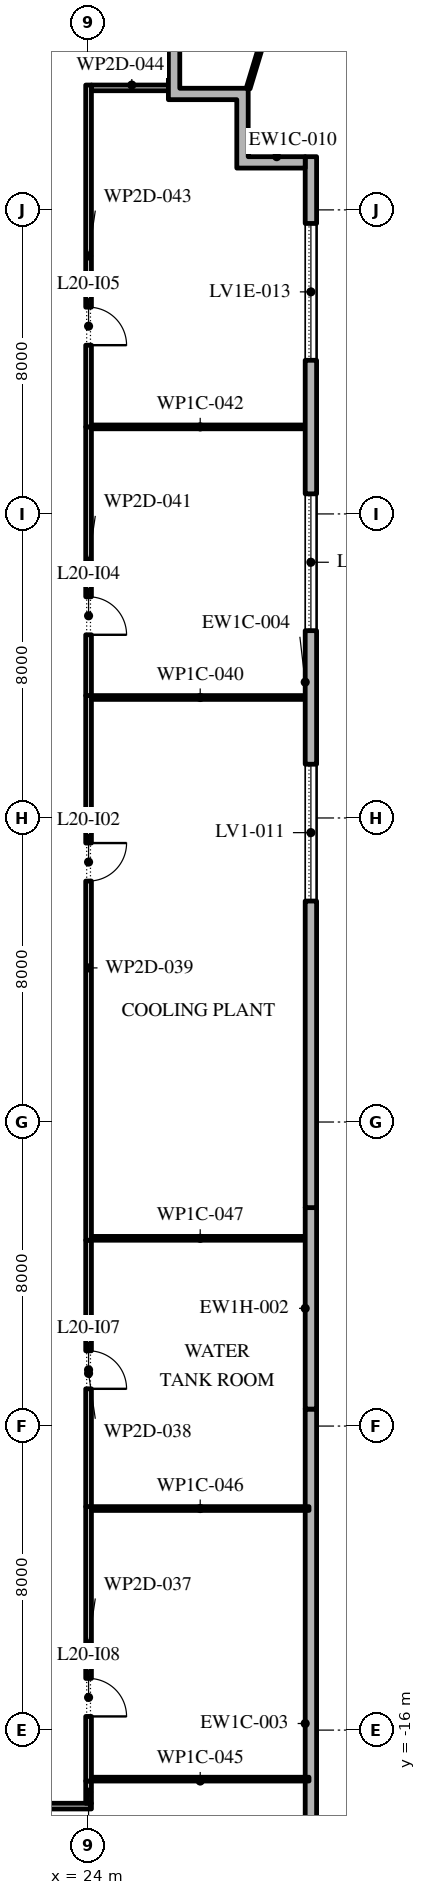
"""IFC4 building model, lengths in metres.
Left out: names, types, materials, properties, quantities, classifications, styles, units other than length and angle.
Written with IfcOpenShell. Run it as: python <this file> out.ifc"""

import sys

from ifc_helpers import new_model, si_unit, direction, frame, frame_2d, origin, place, context, subcontext, project, spatial, polyline, rectangle, outline, extrude, element, fill, save


model = new_model("IFC4")
c1 = context("Model", 3, precision=1e-05, world=origin(), true_north=direction((0.0, 1.0)))
c2 = subcontext(c1, "Body", "Model", "MODEL_VIEW")
j1 = project(units=[si_unit("LENGTHUNIT", "METRE"), si_unit("PLANEANGLEUNIT", "RADIAN")], contexts=[c1])
p1 = place(None, origin())
s1 = spatial("IfcSite", under=j1, at=p1, CompositionType="ELEMENT")
p2 = place(p1, origin())
s2 = spatial("IfcBuilding", under=s1, at=p2, CompositionType="ELEMENT")
p3 = place(p2, frame((0.0, 0.0, 94.2)))
s3 = spatial("IfcBuildingStorey", under=s2, at=p3, CompositionType="ELEMENT", Elevation=94.2)
p4 = place(p3, frame((29.85, -24.1, 0.0), z_axis=(0.0, 0.0, 1.0), x_axis=(0.0, 1.0, 0.0)))
e1 = element("IfcWall", 1, at=p4, inside=s3, PredefinedType="STANDARD", context=c2, shape_type="SweptSolid", body=[
    extrude(rectangle(XDim=16.547, YDim=0.3, at=frame_2d((8.273, 0.0))), origin(), (0.0, 0.0, 1.0), 4.95),
])
p5 = place(p3, origin())
e2 = element("IfcWall", 2, at=p5, inside=s3, PredefinedType="STANDARD", context=c2, shape_type="SweptSolid", body=[
    extrude(outline(polyline([(27.9, 26.9), (26.1, 26.9), (26.1, 29.0), (26.4, 29.0), (26.4, 27.2), (28.2, 27.2), (28.2, 25.4), (29.7, 25.4), (29.7, 25.1), (27.9, 25.1), (27.9, 26.9)])), origin(), (0.0, 0.0, 1.0), 4.95),
])
p6 = place(p3, frame((28.2, 27.2, -0.05), z_axis=(0.0, 0.0, 1.0), x_axis=(0.29036881155, 0.956914809834, 0.0)))
e3 = element("IfcWall", 3, at=p6, inside=s3, PredefinedType="STANDARD", context=c2, shape_type="SweptSolid", body=[
    extrude(rectangle(XDim=7.255, YDim=0.1, at=frame_2d((3.627, 0.0))), origin(), (0.0, 0.0, 1.0), 5.0),
])
p7 = place(p3, frame((24.075, -18.0, 0.0), z_axis=(0.0, 0.0, 1.0), x_axis=(-1.0, 0.0, 0.0)))
e4 = element("IfcWall", 4, at=p7, inside=s3, PredefinedType="PARTITIONING", context=c2, shape_type="SweptSolid", body=[
    extrude(rectangle(XDim=6.425, YDim=0.15, at=frame_2d((3.212, 0.0))), origin(), (0.0, 0.0, 1.0), 4.95),
])
p8 = place(p7, frame((2.075, 0.0, 0.0)))
e5 = element("IfcOpeningElement", 5, at=p8, cuts=e4, PredefinedType="OPENING", context=c2, shape_type="SweptSolid", body=[
    extrude(rectangle(XDim=1.0, YDim=2.1, at=frame_2d((0.5, 1.05))), frame((0.0, 0.085, 0.0), z_axis=(0.0, -1.0, 0.0), x_axis=(1.0, 0.0, 0.0)), (0.0, 0.0, 1.0), 0.17),
])
p9 = place(p3, frame((24.0, -17.34, 0.0), z_axis=(0.0, 0.0, 1.0), x_axis=(0.0, -1.0, 0.0)))
e6 = element("IfcWall", 6, at=p9, inside=s3, PredefinedType="PARTITIONING", context=c2, shape_type="SweptSolid", body=[
    extrude(rectangle(XDim=0.585, YDim=0.15, at=frame_2d((0.292, 0.0))), origin(), (0.0, 0.0, 1.0), 4.95),
])
p10 = place(p3, frame((24.0, -10.12, 0.0), z_axis=(0.0, 0.0, 1.0), x_axis=(0.0, -1.0, 0.0)))
e7 = element("IfcWall", 7, at=p10, inside=s3, PredefinedType="PARTITIONING", context=c2, shape_type="SweptSolid", body=[
    extrude(rectangle(XDim=7.22, YDim=0.15, at=frame_2d((3.61, 0.0))), origin(), (0.0, 0.0, 1.0), 4.95),
])
p11 = place(p10, frame((4.52, 0.0, 0.0)))
e8 = element("IfcOpeningElement", 8, at=p11, cuts=e7, PredefinedType="OPENING", context=c2, shape_type="SweptSolid", body=[
    extrude(rectangle(XDim=1.0, YDim=2.1, at=frame_2d((0.5, 1.05))), frame((0.0, 0.085, 0.0), z_axis=(0.0, -1.0, 0.0), x_axis=(1.0, 0.0, 0.0)), (0.0, 0.0, 1.0), 0.17),
])
p12 = place(p3, frame((24.0, -3.11, 0.0), z_axis=(0.0, 0.0, 1.0), x_axis=(0.0, -1.0, 0.0)))
e9 = element("IfcWall", 9, at=p12, inside=s3, PredefinedType="PARTITIONING", context=c2, shape_type="SweptSolid", body=[
    extrude(rectangle(XDim=7.01, YDim=0.15, at=frame_2d((3.505, 0.0))), origin(), (0.0, 0.0, 1.0), 4.95),
])
p13 = place(p12, frame((2.91, 0.0, 0.0)))
e10 = element("IfcOpeningElement", 10, at=p13, cuts=e9, PredefinedType="OPENING", context=c2, shape_type="SweptSolid", body=[
    extrude(rectangle(XDim=1.0, YDim=2.1, at=frame_2d((0.5, 1.05))), frame((0.0, 0.085, 0.0), z_axis=(0.0, -1.0, 0.0), x_axis=(1.0, 0.0, 0.0)), (0.0, 0.0, 1.0), 0.17),
])
p14 = place(p3, frame((24.0, 11.22, 0.0), z_axis=(0.0, 0.0, 1.0), x_axis=(0.0, -1.0, 0.0)))
e11 = element("IfcWall", 11, at=p14, inside=s3, PredefinedType="PARTITIONING", context=c2, shape_type="SweptSolid", body=[
    extrude(rectangle(XDim=14.33, YDim=0.15, at=frame_2d((7.165, 0.0))), origin(), (0.0, 0.0, 1.0), 4.95),
])
p15 = place(p14, frame((3.88, 0.0, 0.0)))
e12 = element("IfcOpeningElement", 12, at=p15, cuts=e11, PredefinedType="OPENING", context=c2, shape_type="SweptSolid", body=[
    extrude(rectangle(XDim=1.0, YDim=2.1, at=frame_2d((0.5, 1.05))), frame((0.0, 0.085, 0.0), z_axis=(0.0, -1.0, 0.0), x_axis=(1.0, 0.0, 0.0)), (0.0, 0.0, 1.0), 0.17),
])
p16 = place(p3, frame((24.075, 11.17, 0.0), z_axis=(0.0, 0.0, 1.0), x_axis=(1.0, 0.0, 0.0)))
e13 = element("IfcWall", 13, at=p16, inside=s3, PredefinedType="PARTITIONING", context=c2, shape_type="SweptSolid", body=[
    extrude(rectangle(XDim=5.725, YDim=0.1, at=frame_2d((2.863, 0.0))), origin(), (0.0, 0.0, 1.0), 4.95),
])
p17 = place(p3, frame((24.0, 18.29, 0.0), z_axis=(0.0, 0.0, 1.0), x_axis=(0.0, -1.0, 0.0)))
e14 = element("IfcWall", 14, at=p17, inside=s3, PredefinedType="PARTITIONING", context=c2, shape_type="SweptSolid", body=[
    extrude(rectangle(XDim=7.07, YDim=0.15, at=frame_2d((3.535, 0.0))), origin(), (0.0, 0.0, 1.0), 4.95),
])
p18 = place(p17, frame((4.47, 0.0, 0.0)))
e15 = element("IfcOpeningElement", 15, at=p18, cuts=e14, PredefinedType="OPENING", context=c2, shape_type="SweptSolid", body=[
    extrude(rectangle(XDim=1.0, YDim=2.1, at=frame_2d((0.5, 1.05))), frame((0.0, 0.085, 0.0), z_axis=(0.0, -1.0, 0.0), x_axis=(1.0, 0.0, 0.0)), (0.0, 0.0, 1.0), 0.17),
])
p19 = place(p3, frame((24.075, 18.29, 0.0), z_axis=(0.0, 0.0, 1.0), x_axis=(1.0, 0.0, 0.0)))
e16 = element("IfcWall", 16, at=p19, inside=s3, PredefinedType="PARTITIONING", context=c2, shape_type="SweptSolid", body=[
    extrude(rectangle(XDim=5.725, YDim=0.1, at=frame_2d((2.863, 0.0))), origin(), (0.0, 0.0, 1.0), 4.95),
])
p20 = place(p3, frame((24.0, 27.285, 0.0), z_axis=(0.0, 0.0, 1.0), x_axis=(0.0, -1.0, 0.0)))
e17 = element("IfcWall", 17, at=p20, inside=s3, PredefinedType="PARTITIONING", context=c2, shape_type="SweptSolid", body=[
    extrude(rectangle(XDim=8.995, YDim=0.15, at=frame_2d((4.498, 0.0))), origin(), (0.0, 0.0, 1.0), 4.95),
])
p21 = place(p20, frame((5.845, 0.0, 0.0)))
e18 = element("IfcOpeningElement", 18, at=p21, cuts=e17, PredefinedType="OPENING", context=c2, shape_type="SweptSolid", body=[
    extrude(rectangle(XDim=1.0, YDim=2.1, at=frame_2d((0.5, 1.05))), frame((0.0, 0.085, 0.0), z_axis=(0.0, -1.0, 0.0), x_axis=(1.0, 0.0, 0.0)), (0.0, 0.0, 1.0), 0.17),
])
p22 = place(p3, frame((26.2, 27.21, 0.0), z_axis=(0.0, 0.0, 1.0), x_axis=(-1.0, 0.0, 0.0)))
e19 = element("IfcWall", 19, at=p22, inside=s3, PredefinedType="PARTITIONING", context=c2, shape_type="SweptSolid", body=[
    extrude(rectangle(XDim=2.125, YDim=0.15, at=frame_2d((1.062, 0.0))), origin(), (0.0, 0.0, 1.0), 4.95),
])
for number, where, z_axis, x_axis in (
    (20, (29.8, -17.29, 0.0), (0.0, 0.0, 1.0), (-1.0, 0.0, 0.0)),
    (21, (29.8, -10.17, 0.0), (0.0, 0.0, 1.0), (-1.0, 0.0, 0.0)),
    (22, (29.8, -3.06, 0.0), (0.0, 0.0, 1.0), (-1.0, 0.0, 0.0)),
):
    element("IfcWall", number, at=place(p3, frame(where, z_axis=z_axis, x_axis=x_axis)), inside=s3, PredefinedType="PARTITIONING", context=c2, shape_type="SweptSolid", body=[
        extrude(rectangle(XDim=5.725, YDim=0.1, at=frame_2d((2.863, 0.0))), origin(), (0.0, 0.0, 1.0), 4.95),
    ])
p23 = place(p3, frame((29.85, -7.553, 0.0), z_axis=(0.0, 0.0, 1.0), x_axis=(0.0, 1.0, 0.0)))
e23 = element("IfcWall", 23, at=p23, inside=s3, PredefinedType="STANDARD", context=c2, shape_type="SweptSolid", body=[
    extrude(rectangle(XDim=5.301, YDim=0.3, at=frame_2d((2.65, 0.0))), origin(), (0.0, 0.0, 1.0), 4.05),
])
p24 = place(p3, frame((29.85, -2.252, 0.0), z_axis=(0.0, 0.0, 1.0), x_axis=(0.0, 1.0, 0.0)))
e24 = element("IfcWall", 24, at=p24, inside=s3, PredefinedType="STANDARD", context=c2, shape_type="SweptSolid", body=[
    extrude(rectangle(XDim=27.652, YDim=0.3, at=frame_2d((13.826, 0.0))), origin(), (0.0, 0.0, 1.0), 4.95),
])
p25 = place(p24, frame((8.067, 0.0, 0.6)))
e25 = element("IfcOpeningElement", 25, at=p25, cuts=e24, PredefinedType="OPENING", context=c2, shape_type="SweptSolid", body=[
    extrude(rectangle(XDim=3.6, YDim=3.9, at=frame_2d((1.8, 1.95))), frame((0.0, 0.16, 0.0), z_axis=(0.0, -1.0, 0.0), x_axis=(1.0, 0.0, 0.0)), (0.0, 0.0, 1.0), 0.32),
])
p26 = place(p24, frame((15.181, 0.0, 0.6)))
e26 = element("IfcOpeningElement", 26, at=p26, cuts=e24, PredefinedType="OPENING", context=c2, shape_type="SweptSolid", body=[
    extrude(rectangle(XDim=3.6, YDim=3.9, at=frame_2d((1.8, 1.95))), frame((0.0, 0.16, 0.0), z_axis=(0.0, -1.0, 0.0), x_axis=(1.0, 0.0, 0.0)), (0.0, 0.0, 1.0), 0.32),
])
p27 = place(p24, frame((22.295, 0.0, 0.6)))
e27 = element("IfcOpeningElement", 27, at=p27, cuts=e24, PredefinedType="OPENING", context=c2, shape_type="SweptSolid", body=[
    extrude(rectangle(XDim=3.6, YDim=3.55, at=frame_2d((1.8, 1.775))), frame((0.0, 0.16, 0.0), z_axis=(0.0, -1.0, 0.0), x_axis=(1.0, 0.0, 0.0)), (0.0, 0.0, 1.0), 0.32),
])
p28 = place(p25, origin())
e28 = element("IfcWindow", 28, at=p28, inside=s3, PartitioningType="DOUBLE_PANEL_HORIZONTAL", PredefinedType="WINDOW", context=c2, shape_type="SweptSolid", body=[
    extrude(rectangle(XDim=3.6, YDim=3.9, at=frame_2d((1.8, 1.95))), frame((0.0, 0.03, 0.0), z_axis=(0.0, -1.0, 0.0), x_axis=(1.0, 0.0, 0.0)), (0.0, 0.0, 1.0), 0.06),
])
fill(e25, e28)
p29 = place(p26, origin())
e29 = element("IfcWindow", 29, at=p29, inside=s3, PartitioningType="DOUBLE_PANEL_HORIZONTAL", PredefinedType="WINDOW", context=c2, shape_type="SweptSolid", body=[
    extrude(rectangle(XDim=3.6, YDim=3.9, at=frame_2d((1.8, 1.95))), frame((0.0, 0.03, 0.0), z_axis=(0.0, -1.0, 0.0), x_axis=(1.0, 0.0, 0.0)), (0.0, 0.0, 1.0), 0.06),
])
fill(e26, e29)
p30 = place(p27, origin())
e30 = element("IfcWindow", 30, at=p30, inside=s3, PartitioningType="DOUBLE_PANEL_HORIZONTAL", PredefinedType="WINDOW", context=c2, shape_type="SweptSolid", body=[
    extrude(rectangle(XDim=3.6, YDim=3.55, at=frame_2d((1.8, 1.775))), frame((0.0, 0.03, 0.0), z_axis=(0.0, -1.0, 0.0), x_axis=(1.0, 0.0, 0.0)), (0.0, 0.0, 1.0), 0.06),
])
fill(e27, e30)
p31 = place(p15, origin())
e31 = element("IfcDoor", 31, at=p31, inside=s3, OperationType="SINGLE_SWING_RIGHT", PredefinedType="DOOR", context=c2, shape_type="SweptSolid", body=[
    extrude(rectangle(XDim=1.0, YDim=2.1, at=frame_2d((0.5, 1.05))), frame((0.0, 0.025, 0.0), z_axis=(0.0, -1.0, 0.0), x_axis=(1.0, 0.0, 0.0)), (0.0, 0.0, 1.0), 0.05),
])
fill(e12, e31)
p32 = place(p18, origin())
e32 = element("IfcDoor", 32, at=p32, inside=s3, OperationType="SINGLE_SWING_LEFT", PredefinedType="DOOR", context=c2, shape_type="SweptSolid", body=[
    extrude(rectangle(XDim=1.0, YDim=2.1, at=frame_2d((0.5, 1.05))), frame((0.0, 0.025, 0.0), z_axis=(0.0, -1.0, 0.0), x_axis=(1.0, 0.0, 0.0)), (0.0, 0.0, 1.0), 0.05),
])
fill(e15, e32)
p33 = place(p21, origin())
e33 = element("IfcDoor", 33, at=p33, inside=s3, OperationType="SINGLE_SWING_LEFT", PredefinedType="DOOR", context=c2, shape_type="SweptSolid", body=[
    extrude(rectangle(XDim=1.0, YDim=2.1, at=frame_2d((0.5, 1.05))), frame((0.0, 0.025, 0.0), z_axis=(0.0, -1.0, 0.0), x_axis=(1.0, 0.0, 0.0)), (0.0, 0.0, 1.0), 0.05),
])
fill(e18, e33)
p34 = place(p13, origin())
e34 = element("IfcDoor", 34, at=p34, inside=s3, OperationType="SINGLE_SWING_LEFT", PredefinedType="DOOR", context=c2, shape_type="SweptSolid", body=[
    extrude(rectangle(XDim=1.0, YDim=2.1, at=frame_2d((0.5, 1.05))), frame((0.0, 0.025, 0.0), z_axis=(0.0, -1.0, 0.0), x_axis=(1.0, 0.0, 0.0)), (0.0, 0.0, 1.0), 0.05),
])
fill(e10, e34)
p35 = place(p11, origin())
e35 = element("IfcDoor", 35, at=p35, inside=s3, OperationType="SINGLE_SWING_LEFT", PredefinedType="DOOR", context=c2, shape_type="SweptSolid", body=[
    extrude(rectangle(XDim=1.0, YDim=2.1, at=frame_2d((0.5, 1.05))), frame((0.0, 0.025, 0.0), z_axis=(0.0, -1.0, 0.0), x_axis=(1.0, 0.0, 0.0)), (0.0, 0.0, 1.0), 0.05),
])
fill(e8, e35)
save(model, sys.argv[1])
